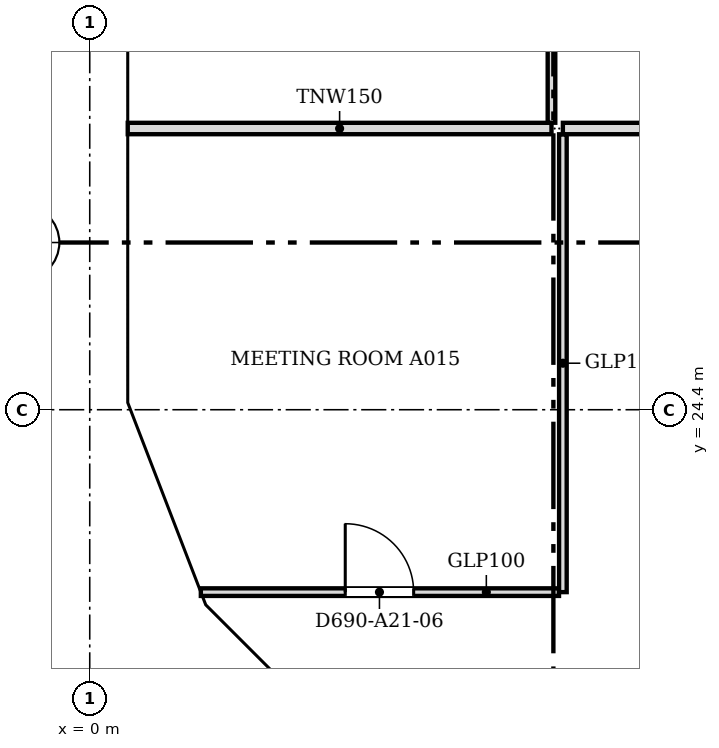
"""IFC4 building model, lengths in metres.
Left out: names, types, materials, properties, quantities, classifications, styles, units other than length and angle.
Written with IfcOpenShell. Run it as: python <this file> out.ifc"""

import sys

from ifc_helpers import new_model, si_unit, direction, frame, frame_2d, origin, place, context, subcontext, project, spatial, polyline, rectangle, outline, extrude, faceted_brep, source, transform, mapped, element, fill, save


model = new_model("IFC4")
c1 = context("Model", 3, precision=1e-05, world=origin(), true_north=direction((0.0, 1.0)))
c2 = subcontext(c1, "Body", "Model", "MODEL_VIEW")
j1 = project(units=[si_unit("LENGTHUNIT", "METRE"), si_unit("PLANEANGLEUNIT", "RADIAN")], contexts=[c1])
p1 = place(None, origin())
s1 = spatial("IfcSite", under=j1, at=p1, CompositionType="ELEMENT")
p2 = place(p1, origin())
s2 = spatial("IfcBuilding", under=s1, at=p2, CompositionType="ELEMENT")
p3 = place(p2, frame((0.0, 0.0, 248.3)))
s3 = spatial("IfcBuildingStorey", under=s2, at=p3, CompositionType="ELEMENT", Elevation=248.3)
m1 = source(origin(), c2, "Body", "SweptSolid", [
    extrude(outline(polyline([(3.05, 0.0), (6.1, 3.8), (3.05, 7.6), (0.0, 3.8), (3.05, 0.0)])), frame((0.0, 0.25, 0.0), z_axis=(0.0, -1.0, 0.0), x_axis=(1.0, 0.0, 0.0)), (0.0, 0.0, 1.0), 0.5),
])
p4 = place(p3, frame((0.25, 33.55, -3.8), z_axis=(0.0, 0.0, 1.0), x_axis=(0.0, -1.0, 0.0)))
e1 = element("IfcWall", 1, at=p4, inside=s3, PredefinedType="SOLIDWALL", context=c2, shape_type="MappedRepresentation", body=[
    mapped(m1, transform((0.0, 0.0, 0.0), scale=1.0)),
])
m2 = source(origin(), c2, "Body", "SweptSolid", [
    extrude(outline(polyline([(3.05, 0.399), (5.78, 3.8), (3.05, 7.201), (0.321, 3.8), (3.05, 0.399)])), frame((0.0, 0.26, 0.0), z_axis=(0.0, -1.0, 0.0), x_axis=(1.0, 0.0, 0.0)), (0.0, 0.0, 1.0), 0.52),
])
p5 = place(p4, origin())
e2 = element("IfcOpeningElement", 2, at=p5, cuts=e1, PredefinedType="OPENING", context=c2, shape_type="MappedRepresentation", body=[
    mapped(m2, transform((0.0, 0.0, 0.0), scale=1.0)),
])
m3 = source(origin(), c2, "Body", "Brep", [
    faceted_brep([(3.003, -0.25, 0.0), (3.05, -0.25, 0.06), (3.05, -0.25, 7.54), (3.003, -0.25, 7.6), (0.0, -0.25, 3.8), (0.0, 0.25, 3.8), (2.957, 0.25, 7.541), (2.957, 0.25, 0.059), (3.003, 0.0, 0.0), (3.003, 0.0, 7.6)], [[[0, 1, 2, 3, 4]], [[5, 6, 7]], [[1, 0, 8]], [[9, 3, 2]], [[6, 5, 4, 3, 9]], [[5, 7, 8, 0, 4]], [[1, 8, 7, 6, 9, 2]]]),
])
p6 = place(p3, frame((0.25, 27.45, -3.8), z_axis=(0.0, 0.0, 1.0), x_axis=(0.0, -1.0, 0.0)))
e3 = element("IfcWall", 3, at=p6, inside=s3, PredefinedType="SOLIDWALL", context=c2, shape_type="MappedRepresentation", body=[
    mapped(m3, transform((0.0, 0.0, 0.0), scale=1.0)),
])
m4 = source(origin(), c2, "Body", "SweptSolid", [
    extrude(outline(polyline([(2.803, 6.944), (0.319, 3.8), (2.803, 0.656), (2.803, 6.944)])), frame((0.0, 0.26, 0.0), z_axis=(0.0, -1.0, 0.0), x_axis=(1.0, 0.0, 0.0)), (0.0, 0.0, 1.0), 0.52),
])
p7 = place(p6, origin())
e4 = element("IfcOpeningElement", 4, at=p7, cuts=e3, PredefinedType="OPENING", context=c2, shape_type="MappedRepresentation", body=[
    mapped(m4, transform((0.0, 0.0, 0.0), scale=1.0)),
])
m5 = source(origin(), c2, "Body", "Brep", [
    faceted_brep([(0.047, -0.25, 0.0), (2.997, -0.25, 3.8), (0.047, -0.25, 7.6), (0.0, -0.25, 7.541), (0.0, -0.25, 0.059), (0.093, 0.25, 7.54), (2.944, 0.25, 3.868), (2.944, 0.25, 3.732), (0.093, 0.25, 0.06), (2.997, 0.0, 3.8), (0.047, 0.0, 0.0), (0.047, 0.0, 7.6)], [[[0, 1, 2, 3, 4]], [[5, 6, 7, 8]], [[8, 7, 9, 1, 0, 10]], [[6, 5, 11, 2, 1, 9]], [[3, 2, 11]], [[10, 0, 4]], [[8, 10, 4, 3, 11, 5]], [[9, 7, 6]]]),
])
p8 = place(p3, frame((0.233, 24.49, -3.8), z_axis=(0.0, 0.0, 1.0), x_axis=(0.359901446078, -0.932990326376, 0.0)))
e5 = element("IfcWall", 5, at=p8, inside=s3, PredefinedType="SOLIDWALL", context=c2, shape_type="MappedRepresentation", body=[
    mapped(m5, transform((0.0, 0.0, 0.0), scale=1.0)),
])
m6 = source(origin(), c2, "Body", "SweptSolid", [
    extrude(outline(polyline([(0.247, 0.665), (2.681, 3.8), (0.247, 6.935), (0.247, 0.665)])), frame((0.0, 0.26, 0.0), z_axis=(0.0, -1.0, 0.0), x_axis=(1.0, 0.0, 0.0)), (0.0, 0.0, 1.0), 0.52),
])
p9 = place(p8, origin())
e6 = element("IfcOpeningElement", 6, at=p9, cuts=e5, PredefinedType="OPENING", context=c2, shape_type="MappedRepresentation", body=[
    mapped(m6, transform((0.0, 0.0, 0.0), scale=1.0)),
])
m7 = source(origin(), c2, "Body", "Brep", [
    faceted_brep([(2.944, -0.25, 0.0), (2.997, -0.25, 0.068), (2.997, -0.25, 7.532), (2.944, -0.25, 7.6), (0.0, -0.25, 3.8), (0.053, 0.25, 3.868), (2.891, 0.25, 7.532), (2.891, 0.25, 0.068), (0.053, 0.25, 3.732), (2.944, 0.0, 0.0), (2.944, 0.0, 7.6), (0.0, 0.0, 3.8)], [[[0, 1, 2, 3, 4]], [[5, 6, 7, 8]], [[1, 0, 9]], [[10, 3, 2]], [[6, 5, 11, 4, 3, 10]], [[8, 7, 9, 0, 4, 11]], [[8, 11, 5]], [[1, 9, 7, 6, 10, 2]]]),
])
p10 = place(p3, frame((1.312, 21.694, -3.8), z_axis=(0.0, 0.0, 1.0), x_axis=(0.707066050402, -0.707147509625, 0.0)))
e7 = element("IfcWall", 7, at=p10, inside=s3, PredefinedType="SOLIDWALL", context=c2, shape_type="MappedRepresentation", body=[
    mapped(m7, transform((0.0, 0.0, 0.0), scale=1.0)),
])
m8 = source(origin(), c2, "Body", "SweptSolid", [
    extrude(outline(polyline([(2.744, 6.934), (0.316, 3.8), (2.744, 0.666), (2.744, 6.934)])), frame((0.0, 0.26, 0.0), z_axis=(0.0, -1.0, 0.0), x_axis=(1.0, 0.0, 0.0)), (0.0, 0.0, 1.0), 0.52),
])
p11 = place(p10, origin())
e8 = element("IfcOpeningElement", 8, at=p11, cuts=e7, PredefinedType="OPENING", context=c2, shape_type="MappedRepresentation", body=[
    mapped(m8, transform((0.0, 0.0, 0.0), scale=1.0)),
])
p12 = place(p2, frame((0.0, 0.0, 252.1)))
s4 = spatial("IfcBuildingStorey", under=s2, at=p12, CompositionType="ELEMENT", Elevation=252.1)
m9 = source(origin(), c2, "Body", "Brep", [
    faceted_brep([(3.05, -0.25, 0.0), (6.053, -0.25, 3.8), (3.05, -0.25, 7.6), (0.0, -0.25, 3.8), (0.0, 0.25, 3.8), (3.05, 0.25, 7.6), (6.007, 0.25, 3.859), (6.007, 0.25, 3.741), (3.05, 0.25, 0.0), (6.053, 0.0, 3.8)], [[[0, 1, 2, 3]], [[4, 5, 6, 7, 8]], [[8, 7, 9, 1, 0]], [[6, 5, 2, 1, 9]], [[5, 4, 3, 2]], [[4, 8, 0, 3]], [[7, 6, 9]]]),
])
p13 = place(p12, frame((0.25, 30.5, -3.8), z_axis=(0.0, 0.0, 1.0), x_axis=(0.0, -1.0, 0.0)))
e9 = element("IfcWall", 9, at=p13, inside=s4, PredefinedType="SOLIDWALL", context=c2, shape_type="MappedRepresentation", body=[
    mapped(m9, transform((0.0, 0.0, 0.0), scale=1.0)),
])
m10 = source(origin(), c2, "Body", "SweptSolid", [
    extrude(outline(polyline([(3.049, 0.401), (5.735, 3.8), (3.049, 7.199), (0.321, 3.8), (3.049, 0.401)])), frame((0.0, 0.26, 0.0), z_axis=(0.0, -1.0, 0.0), x_axis=(1.0, 0.0, 0.0)), (0.0, 0.0, 1.0), 0.52),
])
p14 = place(p13, origin())
e10 = element("IfcOpeningElement", 10, at=p14, cuts=e9, PredefinedType="OPENING", context=c2, shape_type="MappedRepresentation", body=[
    mapped(m10, transform((0.0, 0.0, 0.0), scale=1.0)),
])
m11 = source(origin(), c2, "Body", "Brep", [
    faceted_brep([(2.95, -0.25, 0.0), (3.003, -0.25, 0.068), (3.003, -0.25, 7.531), (2.95, -0.25, 7.6), (0.0, -0.25, 3.8), (0.047, 0.25, 3.86), (2.898, 0.25, 7.532), (2.898, 0.25, 0.068), (0.047, 0.25, 3.74), (2.95, 0.0, 0.0), (2.95, 0.0, 7.6), (0.0, 0.0, 3.8)], [[[0, 1, 2, 3, 4]], [[5, 6, 7, 8]], [[1, 0, 9]], [[10, 3, 2]], [[6, 5, 11, 4, 3, 10]], [[8, 7, 9, 0, 4, 11]], [[8, 11, 5]], [[1, 9, 7, 6, 10, 2]]]),
])
p15 = place(p12, frame((0.25, 24.447, -3.8), z_axis=(0.0, 0.0, 1.0), x_axis=(0.35992665181, -0.932980602862, 0.0)))
e11 = element("IfcWall", 11, at=p15, inside=s4, PredefinedType="SOLIDWALL", context=c2, shape_type="MappedRepresentation", body=[
    mapped(m11, transform((0.0, 0.0, 0.0), scale=1.0)),
])
m12 = source(origin(), c2, "Body", "SweptSolid", [
    extrude(outline(polyline([(2.75, 6.935), (0.316, 3.8), (2.75, 0.665), (2.75, 6.935)])), frame((0.0, 0.26, 0.0), z_axis=(0.0, -1.0, 0.0), x_axis=(1.0, 0.0, 0.0)), (0.0, 0.0, 1.0), 0.52),
])
p16 = place(p15, origin())
e12 = element("IfcOpeningElement", 12, at=p16, cuts=e11, PredefinedType="OPENING", context=c2, shape_type="MappedRepresentation", body=[
    mapped(m12, transform((0.0, 0.0, 0.0), scale=1.0)),
])
m13 = source(origin(), c2, "Body", "Brep", [
    faceted_brep([(0.053, -0.25, 0.0), (2.997, -0.25, 3.8), (0.053, -0.25, 7.6), (0.0, -0.25, 7.532), (0.0, -0.25, 0.068), (0.106, 0.25, 7.531), (2.944, 0.25, 3.868), (2.944, 0.25, 3.732), (0.106, 0.25, 0.068), (2.997, 0.0, 3.8), (0.053, 0.0, 0.0), (0.053, 0.0, 7.6)], [[[0, 1, 2, 3, 4]], [[5, 6, 7, 8]], [[8, 7, 9, 1, 0, 10]], [[6, 5, 11, 2, 1, 9]], [[3, 2, 11]], [[10, 0, 4]], [[8, 10, 4, 3, 11, 5]], [[7, 6, 9]]]),
])
p17 = place(p12, frame((1.274, 21.731, -3.8), z_axis=(0.0, 0.0, 1.0), x_axis=(0.707147509625, -0.707066050402, 0.0)))
e13 = element("IfcWall", 13, at=p17, inside=s4, PredefinedType="SOLIDWALL", context=c2, shape_type="MappedRepresentation", body=[
    mapped(m13, transform((0.0, 0.0, 0.0), scale=1.0)),
])
m14 = source(origin(), c2, "Body", "SweptSolid", [
    extrude(outline(polyline([(0.253, 0.666), (2.681, 3.8), (0.253, 6.934), (0.253, 0.666)])), frame((0.0, 0.26, 0.0), z_axis=(0.0, -1.0, 0.0), x_axis=(1.0, 0.0, 0.0)), (0.0, 0.0, 1.0), 0.52),
])
p18 = place(p17, origin())
e14 = element("IfcOpeningElement", 14, at=p18, cuts=e13, PredefinedType="OPENING", context=c2, shape_type="MappedRepresentation", body=[
    mapped(m14, transform((0.0, 0.0, 0.0), scale=1.0)),
])
p19 = place(p3, frame((1.462, 22.0, 0.0), z_axis=(0.0, 0.0, 1.0), x_axis=(1.0, 0.0, 0.0)))
e15 = element("IfcWall", 15, at=p19, inside=s3, PredefinedType="PARTITIONING", context=c2, shape_type="SweptSolid", body=[
    extrude(rectangle(XDim=4.712, YDim=0.1, at=frame_2d((2.356, 0.0))), origin(), (0.0, 0.0, 1.0), 3.067),
])
m15 = source(origin(), c2, "Body", "SweptSolid", [
    extrude(rectangle(XDim=0.9, YDim=2.1, at=frame_2d((0.45, 1.05))), frame((0.0, 0.06, 0.0), z_axis=(0.0, -1.0, 0.0), x_axis=(1.0, 0.0, 0.0)), (0.0, 0.0, 1.0), 0.12),
])
p20 = place(p19, frame((1.9, 0.0, 0.0)))
e16 = element("IfcOpeningElement", 16, at=p20, cuts=e15, PredefinedType="OPENING", context=c2, shape_type="MappedRepresentation", body=[
    mapped(m15, transform((0.0, 0.0, 0.0), scale=1.0)),
])
p21 = place(p3, frame((6.225, 22.0, 0.0), z_axis=(0.0, 0.0, 1.0), x_axis=(0.0, 1.0, 0.0)))
e17 = element("IfcWall", 17, at=p21, inside=s3, PredefinedType="PARTITIONING", context=c2, shape_type="SweptSolid", body=[
    extrude(rectangle(XDim=6.024, YDim=0.1, at=frame_2d((3.012, 0.0))), origin(), (0.0, 0.0, 1.0), 3.067),
])
p22 = place(p3, frame((0.5, 28.1, 0.0), z_axis=(0.0, 0.0, 1.0), x_axis=(1.0, 0.0, 0.0)))
e18 = element("IfcWall", 18, at=p22, inside=s3, PredefinedType="PARTITIONING", context=c2, shape_type="SweptSolid", body=[
    extrude(rectangle(XDim=5.575, YDim=0.15, at=frame_2d((2.788, 0.0))), origin(), (0.0, 0.0, 1.0), 3.067),
])
p23 = place(p3, frame((6.225, 28.1, 0.0), z_axis=(0.0, 0.0, 1.0), x_axis=(1.0, 0.0, 0.0)))
e19 = element("IfcWall", 19, at=p23, inside=s3, PredefinedType="PARTITIONING", context=c2, shape_type="SweptSolid", body=[
    extrude(rectangle(XDim=21.799, YDim=0.15, at=frame_2d((10.899, 0.0))), origin(), (0.0, 0.0, 1.0), 3.067),
])
p24 = place(p3, frame((6.075, 28.176, 0.0), z_axis=(0.0, 0.0, 1.0), x_axis=(0.0, 1.0, 0.0)))
e20 = element("IfcWall", 20, at=p24, inside=s3, PredefinedType="PARTITIONING", context=c2, shape_type="SweptSolid", body=[
    extrude(rectangle(XDim=5.948, YDim=0.1, at=frame_2d((2.974, 0.0))), origin(), (0.0, 0.0, 1.0), 3.067),
])
p25 = place(p24, frame((2.5, 0.0, 0.0)))
e21 = element("IfcOpeningElement", 21, at=p25, cuts=e20, PredefinedType="OPENING", context=c2, shape_type="MappedRepresentation", body=[
    mapped(m15, transform((0.0, 0.0, 0.0), scale=1.0)),
])
m16 = source(origin(), c2, "Body", "SweptSolid", [
    extrude(rectangle(XDim=0.9, YDim=2.1, at=frame_2d((0.45, 1.05))), frame((0.0, 0.025, 0.0), z_axis=(0.0, -1.0, 0.0), x_axis=(1.0, 0.0, 0.0)), (0.0, 0.0, 1.0), 0.05),
])
p26 = place(p20, origin())
e22 = element("IfcDoor", 22, at=p26, inside=s3, OperationType="SINGLE_SWING_LEFT", PredefinedType="DOOR", context=c2, shape_type="MappedRepresentation", body=[
    mapped(m16, transform((0.0, 0.0, 0.0), scale=1.0)),
])
fill(e16, e22)
save(model, sys.argv[1])
